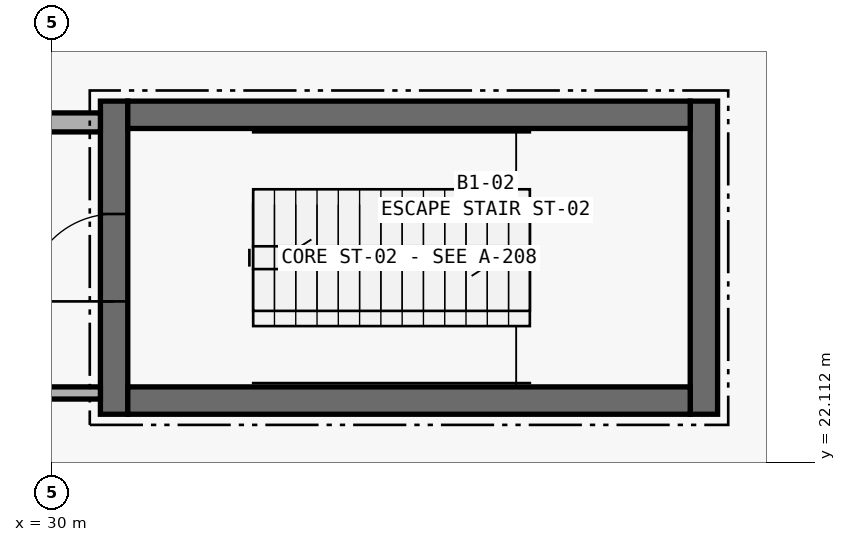
"""IFC4 building model, lengths in metres.
Left out: names, types, materials, properties, quantities, classifications, styles, units other than length and angle.
Written with IfcOpenShell. Run it as: python <this file> out.ifc"""

import sys

from ifc_helpers import new_model, si_unit, direction, frame, frame_2d, origin, place, context, subcontext, project, spatial, rectangle, extrude, element, fill, save


model = new_model("IFC4")
c1 = context("Model", 3, precision=1e-05, world=origin(), true_north=direction((0.0, 1.0)))
c2 = subcontext(c1, "Body", "Model", "MODEL_VIEW")
j1 = project(units=[si_unit("LENGTHUNIT", "METRE"), si_unit("PLANEANGLEUNIT", "RADIAN")], contexts=[c1])
p1 = place(None, origin())
s1 = spatial("IfcSite", under=j1, at=p1, CompositionType="ELEMENT")
p2 = place(p1, origin())
s2 = spatial("IfcBuilding", under=s1, at=p2, CompositionType="ELEMENT")
p3 = place(p2, frame((0.0, 0.0, -4.8)))
s3 = spatial("IfcBuildingStorey", under=s2, at=p3, CompositionType="ELEMENT", Elevation=-4.8)
p4 = place(p3, frame((30.82, 22.74, 0.0), z_axis=(0.0, 0.0, 1.0), x_axis=(0.0, 1.0, 0.0)))
e1 = element("IfcWall", 1, at=p4, inside=s3, PredefinedType="SHEAR", context=c2, shape_type="SweptSolid", body=[
    extrude(rectangle(XDim=4.12, YDim=0.36, at=frame_2d((2.06, 0.0))), origin(), (0.0, 0.0, 1.0), 4.38),
])
p5 = place(p4, frame((1.485, 0.0, 0.0)))
e2 = element("IfcOpeningElement", 2, at=p5, cuts=e1, PredefinedType="OPENING", context=c2, shape_type="SweptSolid", body=[
    extrude(rectangle(XDim=1.15, YDim=2.15, at=frame_2d((0.575, 1.075))), frame((0.0, 0.195, 0.0), z_axis=(0.0, -1.0, 0.0), x_axis=(1.0, 0.0, 0.0)), (0.0, 0.0, 1.0), 0.39),
])
p6 = place(p3, frame((38.58, 22.74, 0.0), z_axis=(0.0, 0.0, 1.0), x_axis=(0.0, 1.0, 0.0)))
e3 = element("IfcWall", 3, at=p6, inside=s3, PredefinedType="SHEAR", context=c2, shape_type="SweptSolid", body=[
    extrude(rectangle(XDim=4.12, YDim=0.36, at=frame_2d((2.06, 0.0))), origin(), (0.0, 0.0, 1.0), 4.38),
])
for number, where, z_axis, x_axis in (
    (4, (31.0, 26.68, 0.0), (0.0, 0.0, 1.0), (1.0, 0.0, 0.0)),
    (5, (31.0, 22.92, 0.0), (0.0, 0.0, 1.0), (1.0, 0.0, 0.0)),
):
    element("IfcWall", number, at=place(p3, frame(where, z_axis=z_axis, x_axis=x_axis)), inside=s3, PredefinedType="SHEAR", context=c2, shape_type="SweptSolid", body=[
        extrude(rectangle(XDim=7.4, YDim=0.36, at=frame_2d((3.7, 0.0))), origin(), (0.0, 0.0, 1.0), 4.38),
    ])
p7 = place(p3, frame((29.5, 23.02, 0.0), z_axis=(0.0, 0.0, 1.0), x_axis=(1.0, 0.0, 0.0)))
e6 = element("IfcWall", 6, at=p7, inside=s3, PredefinedType="PARTITIONING", context=c2, shape_type="SweptSolid", body=[
    extrude(rectangle(XDim=1.14, YDim=0.16, at=frame_2d((0.57, 0.0))), origin(), (0.0, 0.0, 1.0), 3.26),
])
p8 = place(p3, frame((26.595, 26.58, 0.0), z_axis=(0.0, 0.0, 1.0), x_axis=(1.0, 0.0, 0.0)))
e7 = element("IfcWall", 7, at=p8, inside=s3, PredefinedType="PARTITIONING", context=c2, shape_type="SweptSolid", body=[
    extrude(rectangle(XDim=4.045, YDim=0.25, at=frame_2d((2.022, 0.0))), origin(), (0.0, 0.0, 1.0), 3.26),
])
p9 = place(p5, origin())
e8 = element("IfcDoor", 8, at=p9, inside=s3, OperationType="SINGLE_SWING_LEFT", PredefinedType="DOOR", context=c2, shape_type="SweptSolid", body=[
    extrude(rectangle(XDim=1.15, YDim=2.15, at=frame_2d((0.575, 1.075))), frame((0.0, 0.025, 0.0), z_axis=(0.0, -1.0, 0.0), x_axis=(1.0, 0.0, 0.0)), (0.0, 0.0, 1.0), 0.05),
])
fill(e2, e8)
save(model, sys.argv[1])
